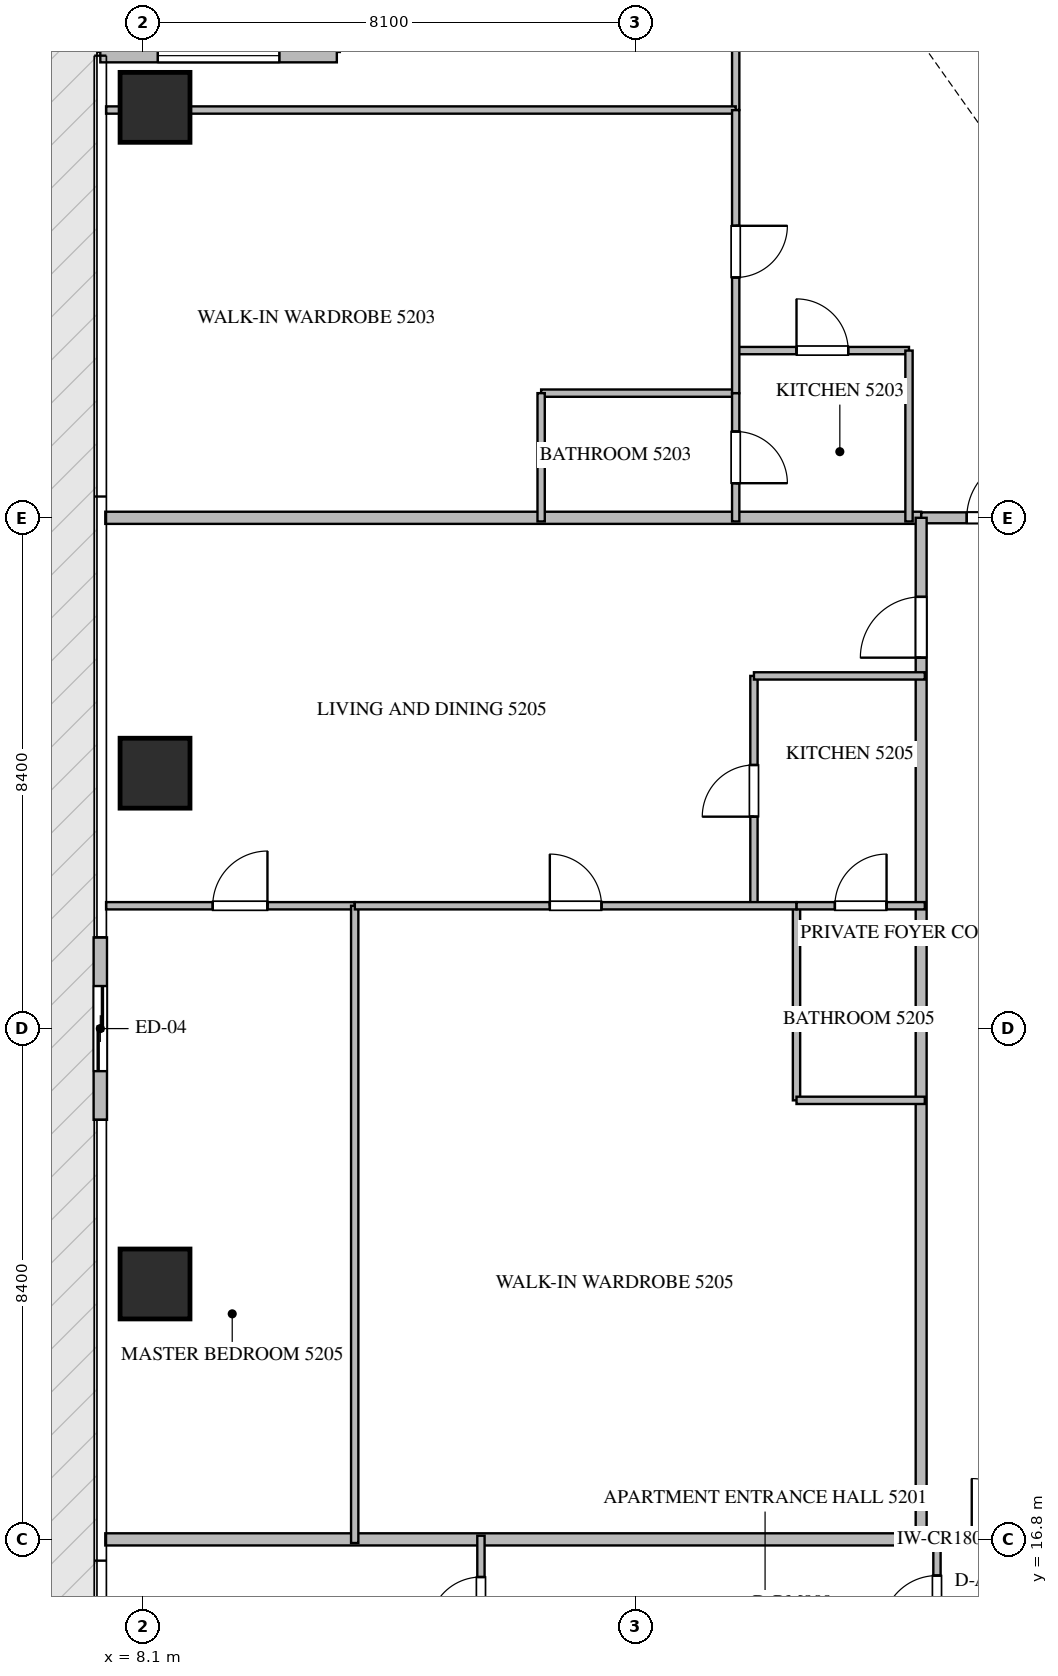
"""IFC4 building model, lengths in metres.
Left out: names, types, materials, properties, quantities, classifications, styles, units other than length and angle.
Written with IfcOpenShell. Run it as: python <this file> out.ifc"""

import sys

from ifc_helpers import new_model, si_unit, direction, frame, frame_2d, origin, origin_2d, place, context, subcontext, project, spatial, rectangle, extrude, source, transform, mapped, element, fill, save


model = new_model("IFC4")
c1 = context("Model", 3, precision=1e-05, world=origin(), true_north=direction((0.0, 1.0)))
c2 = subcontext(c1, "Body", "Model", "MODEL_VIEW")
j1 = project(units=[si_unit("LENGTHUNIT", "METRE"), si_unit("PLANEANGLEUNIT", "RADIAN")], contexts=[c1])
p1 = place(None, origin())
s1 = spatial("IfcSite", under=j1, at=p1, CompositionType="ELEMENT")
p2 = place(p1, origin())
s2 = spatial("IfcBuilding", under=s1, at=p2, CompositionType="ELEMENT")
p3 = place(p2, frame((0.0, 0.0, 210.45)))
s3 = spatial("IfcBuildingStorey", under=s2, at=p3, CompositionType="ELEMENT", Elevation=210.45)
m1 = source(origin(), c2, "Body", "SweptSolid", [
    extrude(rectangle(XDim=1.15, YDim=1.15, at=origin_2d()), origin(), (0.0, 0.0, 1.0), 4.03),
])
for number, where, z_axis, x_axis in (
    (1, (8.3, 21.0, -0.44), (0.0, 0.0, 1.0), (1.0, 0.0, 0.0)),
    (2, (8.3, 29.4, -0.44), (0.0, 0.0, 1.0), (1.0, 0.0, 0.0)),
    (3, (8.3, 40.35, -0.44), (0.0, 0.0, 1.0), (1.0, 0.0, 0.0)),
):
    element("IfcColumn", number, at=place(p3, frame(where, z_axis=z_axis, x_axis=x_axis)), inside=s3, PredefinedType="COLUMN", context=c2, shape_type="MappedRepresentation", body=[
        mapped(m1, transform((0.0, 0.0, 0.0), scale=1.0)),
    ])
p4 = place(p3, frame((11.29, 41.2, 0.0), z_axis=(0.0, 0.0, 1.0), x_axis=(-1.0, 0.0, 0.0)))
e4 = element("IfcWall", 4, at=p4, inside=s3, PredefinedType="ELEMENTEDWALL", context=c2, shape_type="SweptSolid", body=[
    extrude(rectangle(XDim=3.89, YDim=0.22, at=frame_2d((1.945, 0.0))), origin(), (0.0, 0.0, 1.0), 3.575),
])
p5 = place(p4, frame((0.945, 0.0, 0.65)))
e5 = element("IfcOpeningElement", 5, at=p5, cuts=e4, PredefinedType="OPENING", context=c2, shape_type="SweptSolid", body=[
    extrude(rectangle(XDim=2.0, YDim=2.2, at=frame_2d((1.0, 1.1))), frame((0.0, 0.12, 0.0), z_axis=(0.0, -1.0, 0.0), x_axis=(1.0, 0.0, 0.0)), (0.0, 0.0, 1.0), 0.24),
])
p6 = place(p3, frame((7.4, 26.7, 0.0), z_axis=(0.0, 0.0, 1.0), x_axis=(0.0, -1.0, 0.0)))
e6 = element("IfcWall", 6, at=p6, inside=s3, PredefinedType="ELEMENTEDWALL", context=c2, shape_type="SweptSolid", body=[
    extrude(rectangle(XDim=3.0, YDim=0.22, at=frame_2d((1.5, 0.0))), origin(), (0.0, 0.0, 1.0), 3.575),
])
p7 = place(p6, frame((0.8, 0.0, 0.0)))
e7 = element("IfcOpeningElement", 7, at=p7, cuts=e6, PredefinedType="OPENING", context=c2, shape_type="SweptSolid", body=[
    extrude(rectangle(XDim=1.4, YDim=2.25, at=frame_2d((0.7, 1.125))), frame((0.0, 0.12, 0.0), z_axis=(0.0, -1.0, 0.0), x_axis=(1.0, 0.0, 0.0)), (0.0, 0.0, 1.0), 0.24),
])
for number, where, z_axis, x_axis in (
    (8, (7.482, 16.8, 0.0), (0.0, 0.0, 1.0), (1.0, 0.0, 0.0)),
    (9, (7.482, 33.6, 0.0), (0.0, 0.0, 1.0), (1.0, 0.0, 0.0)),
):
    element("IfcWall", number, at=place(p3, frame(where, z_axis=z_axis, x_axis=x_axis)), inside=s3, PredefinedType="PARTITIONING", context=c2, shape_type="SweptSolid", body=[
        extrude(rectangle(XDim=13.418, YDim=0.2, at=frame_2d((6.709, 0.0))), origin(), (0.0, 0.0, 1.0), 3.59),
    ])
p8 = place(p3, frame((20.902, 16.8, 0.0), z_axis=(0.0, 0.0, 1.0), x_axis=(1.0, 0.0, 0.0)))
e10 = element("IfcWall", 10, at=p8, inside=s3, PredefinedType="PARTITIONING", context=c2, shape_type="SweptSolid", body=[
    extrude(rectangle(XDim=2.496, YDim=0.18, at=frame_2d((1.248, 0.0))), origin(), (0.0, 0.0, 1.0), 3.59),
])
p9 = place(p8, frame((0.83, 0.0, 0.0)))
e11 = element("IfcOpeningElement", 11, at=p9, cuts=e10, PredefinedType="OPENING", context=c2, shape_type="SweptSolid", body=[
    extrude(rectangle(XDim=1.0, YDim=2.15, at=frame_2d((0.5, 1.075))), frame((0.0, 0.1, 0.0), z_axis=(0.0, -1.0, 0.0), x_axis=(1.0, 0.0, 0.0)), (0.0, 0.0, 1.0), 0.2),
])
p10 = place(p3, frame((20.902, 33.6, 0.0), z_axis=(0.0, 0.0, 1.0), x_axis=(1.0, 0.0, 0.0)))
e12 = element("IfcWall", 12, at=p10, inside=s3, PredefinedType="PARTITIONING", context=c2, shape_type="SweptSolid", body=[
    extrude(rectangle(XDim=2.496, YDim=0.18, at=frame_2d((1.248, 0.0))), origin(), (0.0, 0.0, 1.0), 3.59),
])
p11 = place(p10, frame((0.748, 0.0, 0.0)))
e13 = element("IfcOpeningElement", 13, at=p11, cuts=e12, PredefinedType="OPENING", context=c2, shape_type="SweptSolid", body=[
    extrude(rectangle(XDim=1.0, YDim=2.15, at=frame_2d((0.5, 1.075))), frame((0.0, 0.1, 0.0), z_axis=(0.0, -1.0, 0.0), x_axis=(1.0, 0.0, 0.0)), (0.0, 0.0, 1.0), 0.2),
])
p12 = place(p3, frame((20.9, 16.8, 0.0), z_axis=(0.0, 0.0, 1.0), x_axis=(0.0, 1.0, 0.0)))
e14 = element("IfcWall", 14, at=p12, inside=s3, PredefinedType="PARTITIONING", context=c2, shape_type="SweptSolid", body=[
    extrude(rectangle(XDim=16.8, YDim=0.18, at=frame_2d((8.4, 0.0))), origin(), (0.0, 0.0, 1.0), 3.59),
])
p13 = place(p12, frame((14.5, 0.0, 0.0)))
e15 = element("IfcOpeningElement", 15, at=p13, cuts=e14, PredefinedType="OPENING", context=c2, shape_type="SweptSolid", body=[
    extrude(rectangle(XDim=1.0, YDim=2.15, at=frame_2d((0.5, 1.075))), frame((0.0, 0.1, 0.0), z_axis=(0.0, -1.0, 0.0), x_axis=(1.0, 0.0, 0.0)), (0.0, 0.0, 1.0), 0.2),
])
p14 = place(p3, frame((21.16, 14.65, 0.0), z_axis=(0.0, 0.0, 1.0), x_axis=(0.0, 1.0, 0.0)))
e16 = element("IfcWall", 16, at=p14, inside=s3, PredefinedType="PARTITIONING", context=c2, shape_type="SweptSolid", body=[
    extrude(rectangle(XDim=2.21, YDim=0.12, at=frame_2d((1.105, 0.0))), origin(), (0.0, 0.0, 1.0), 3.59),
])
p15 = place(p14, frame((0.655, 0.0, 0.0)))
e17 = element("IfcOpeningElement", 17, at=p15, cuts=e16, PredefinedType="OPENING", context=c2, shape_type="SweptSolid", body=[
    extrude(rectangle(XDim=0.9, YDim=2.1, at=frame_2d((0.45, 1.05))), frame((0.0, 0.07, 0.0), z_axis=(0.0, -1.0, 0.0), x_axis=(1.0, 0.0, 0.0)), (0.0, 0.0, 1.0), 0.14),
])
p16 = place(p3, frame((13.66, 14.652, 0.0), z_axis=(0.0, 0.0, 1.0), x_axis=(0.0, 1.0, 0.0)))
e18 = element("IfcWall", 18, at=p16, inside=s3, PredefinedType="PARTITIONING", context=c2, shape_type="SweptSolid", body=[
    extrude(rectangle(XDim=2.208, YDim=0.12, at=frame_2d((1.104, 0.0))), origin(), (0.0, 0.0, 1.0), 3.59),
])
p17 = place(p16, frame((0.679, 0.0, 0.0)))
e19 = element("IfcOpeningElement", 19, at=p17, cuts=e18, PredefinedType="OPENING", context=c2, shape_type="SweptSolid", body=[
    extrude(rectangle(XDim=0.85, YDim=2.1, at=frame_2d((0.425, 1.05))), frame((0.0, 0.07, 0.0), z_axis=(0.0, -1.0, 0.0), x_axis=(1.0, 0.0, 0.0)), (0.0, 0.0, 1.0), 0.14),
])
p18 = place(p3, frame((17.85, 36.35, 0.0), z_axis=(0.0, 0.0, 1.0), x_axis=(1.0, 0.0, 0.0)))
e20 = element("IfcWall", 20, at=p18, inside=s3, PredefinedType="PARTITIONING", context=c2, shape_type="SweptSolid", body=[
    extrude(rectangle(XDim=2.85, YDim=0.12, at=frame_2d((1.425, 0.0))), origin(), (0.0, 0.0, 1.0), 3.59),
])
p19 = place(p18, frame((1.0, 0.0, 0.0)))
e21 = element("IfcOpeningElement", 21, at=p19, cuts=e20, PredefinedType="OPENING", context=c2, shape_type="SweptSolid", body=[
    extrude(rectangle(XDim=0.85, YDim=2.1, at=frame_2d((0.425, 1.05))), frame((0.0, 0.07, 0.0), z_axis=(0.0, -1.0, 0.0), x_axis=(1.0, 0.0, 0.0)), (0.0, 0.0, 1.0), 0.14),
])
p20 = place(p3, frame((20.7, 36.35, 0.0), z_axis=(0.0, 0.0, 1.0), x_axis=(0.0, -1.0, 0.0)))
e22 = element("IfcWall", 22, at=p20, inside=s3, PredefinedType="PARTITIONING", context=c2, shape_type="SweptSolid", body=[
    extrude(rectangle(XDim=2.81, YDim=0.12, at=frame_2d((1.405, 0.0))), origin(), (0.0, 0.0, 1.0), 3.59),
])
p21 = place(p3, frame((17.85, 49.105, 0.0), z_axis=(0.0, 0.0, 1.0), x_axis=(0.0, -1.0, 0.0)))
e23 = element("IfcWall", 23, at=p21, inside=s3, PredefinedType="PARTITIONING", context=c2, shape_type="SweptSolid", body=[
    extrude(rectangle(XDim=8.799, YDim=0.12, at=frame_2d((4.399, 0.0))), origin(), (0.0, 0.0, 1.0), 3.59),
])
p22 = place(p21, frame((4.344, 0.0, 0.0)))
e24 = element("IfcOpeningElement", 24, at=p22, cuts=e23, PredefinedType="OPENING", context=c2, shape_type="SweptSolid", body=[
    extrude(rectangle(XDim=0.9, YDim=2.1, at=frame_2d((0.45, 1.05))), frame((0.0, 0.07, 0.0), z_axis=(0.0, -1.0, 0.0), x_axis=(1.0, 0.0, 0.0)), (0.0, 0.0, 1.0), 0.14),
])
p23 = place(p3, frame((7.495, 40.306, 0.0), z_axis=(0.0, 0.0, 1.0), x_axis=(1.0, 0.0, 0.0)))
e25 = element("IfcWall", 25, at=p23, inside=s3, PredefinedType="PARTITIONING", context=c2, shape_type="SweptSolid", body=[
    extrude(rectangle(XDim=10.355, YDim=0.12, at=frame_2d((5.177, 0.0))), origin(), (0.0, 0.0, 1.0), 3.122),
])
p24 = place(p3, frame((14.65, 35.65, 0.0), z_axis=(0.0, 0.0, 1.0), x_axis=(1.0, 0.0, 0.0)))
e26 = element("IfcWall", 26, at=p24, inside=s3, PredefinedType="PARTITIONING", context=c2, shape_type="SweptSolid", body=[
    extrude(rectangle(XDim=3.2, YDim=0.12, at=frame_2d((1.6, 0.0))), origin(), (0.0, 0.0, 1.0), 3.59),
])
p25 = place(p3, frame((14.65, 35.65, 0.0), z_axis=(0.0, 0.0, 1.0), x_axis=(0.0, -1.0, 0.0)))
e27 = element("IfcWall", 27, at=p25, inside=s3, PredefinedType="PARTITIONING", context=c2, shape_type="SweptSolid", body=[
    extrude(rectangle(XDim=2.11, YDim=0.12, at=frame_2d((1.055, 0.0))), origin(), (0.0, 0.0, 1.0), 3.59),
])
p26 = place(p3, frame((17.85, 40.304, 0.0), z_axis=(0.0, 0.0, 1.0), x_axis=(0.0, -1.0, 0.0)))
e28 = element("IfcWall", 28, at=p26, inside=s3, PredefinedType="PARTITIONING", context=c2, shape_type="SweptSolid", body=[
    extrude(rectangle(XDim=4.654, YDim=0.12, at=frame_2d((2.327, 0.0))), origin(), (0.0, 0.0, 1.0), 3.59),
])
p27 = place(p26, frame((1.902, 0.0, 0.0)))
e29 = element("IfcOpeningElement", 29, at=p27, cuts=e28, PredefinedType="OPENING", context=c2, shape_type="SweptSolid", body=[
    extrude(rectangle(XDim=0.85, YDim=2.1, at=frame_2d((0.425, 1.05))), frame((0.0, 0.07, 0.0), z_axis=(0.0, -1.0, 0.0), x_axis=(1.0, 0.0, 0.0)), (0.0, 0.0, 1.0), 0.14),
])
p28 = place(p3, frame((17.85, 35.648, 0.0), z_axis=(0.0, 0.0, 1.0), x_axis=(0.0, -1.0, 0.0)))
e30 = element("IfcWall", 30, at=p28, inside=s3, PredefinedType="PARTITIONING", context=c2, shape_type="SweptSolid", body=[
    extrude(rectangle(XDim=2.108, YDim=0.12, at=frame_2d((1.054, 0.0))), origin(), (0.0, 0.0, 1.0), 3.59),
])
p29 = place(p28, frame((0.629, 0.0, 0.0)))
e31 = element("IfcOpeningElement", 31, at=p29, cuts=e30, PredefinedType="OPENING", context=c2, shape_type="SweptSolid", body=[
    extrude(rectangle(XDim=0.85, YDim=2.1, at=frame_2d((0.425, 1.05))), frame((0.0, 0.07, 0.0), z_axis=(0.0, -1.0, 0.0), x_axis=(1.0, 0.0, 0.0)), (0.0, 0.0, 1.0), 0.14),
])
p30 = place(p3, frame((18.15, 27.22, 0.0), z_axis=(0.0, 0.0, 1.0), x_axis=(0.0, 1.0, 0.0)))
e32 = element("IfcWall", 32, at=p30, inside=s3, PredefinedType="PARTITIONING", context=c2, shape_type="SweptSolid", body=[
    extrude(rectangle(XDim=3.78, YDim=0.12, at=frame_2d((1.89, 0.0))), origin(), (0.0, 0.0, 1.0), 3.59),
])
p31 = place(p30, frame((1.465, 0.0, 0.0)))
e33 = element("IfcOpeningElement", 33, at=p31, cuts=e32, PredefinedType="OPENING", context=c2, shape_type="SweptSolid", body=[
    extrude(rectangle(XDim=0.85, YDim=2.1, at=frame_2d((0.425, 1.05))), frame((0.0, 0.07, 0.0), z_axis=(0.0, -1.0, 0.0), x_axis=(1.0, 0.0, 0.0)), (0.0, 0.0, 1.0), 0.14),
])
p32 = place(p3, frame((18.15, 31.0, 0.0), z_axis=(0.0, 0.0, 1.0), x_axis=(1.0, 0.0, 0.0)))
e34 = element("IfcWall", 34, at=p32, inside=s3, PredefinedType="PARTITIONING", context=c2, shape_type="SweptSolid", body=[
    extrude(rectangle(XDim=2.81, YDim=0.12, at=frame_2d((1.405, 0.0))), origin(), (0.0, 0.0, 1.0), 3.59),
])
p33 = place(p3, frame((7.495, 27.22, 0.0), z_axis=(0.0, 0.0, 1.0), x_axis=(1.0, 0.0, 0.0)))
e35 = element("IfcWall", 35, at=p33, inside=s3, PredefinedType="PARTITIONING", context=c2, shape_type="SweptSolid", body=[
    extrude(rectangle(XDim=4.089, YDim=0.12, at=frame_2d((2.044, 0.0))), origin(), (0.0, 0.0, 1.0), 3.59),
])
p34 = place(p33, frame((1.754, 0.0, 0.0)))
e36 = element("IfcOpeningElement", 36, at=p34, cuts=e35, PredefinedType="OPENING", context=c2, shape_type="SweptSolid", body=[
    extrude(rectangle(XDim=0.9, YDim=2.1, at=frame_2d((0.45, 1.05))), frame((0.0, 0.07, 0.0), z_axis=(0.0, -1.0, 0.0), x_axis=(1.0, 0.0, 0.0)), (0.0, 0.0, 1.0), 0.14),
])
p35 = place(p3, frame((11.584, 16.74, 0.0), z_axis=(0.0, 0.0, 1.0), x_axis=(0.0, 1.0, 0.0)))
e37 = element("IfcWall", 37, at=p35, inside=s3, PredefinedType="PARTITIONING", context=c2, shape_type="SweptSolid", body=[
    extrude(rectangle(XDim=10.48, YDim=0.12, at=frame_2d((5.24, 0.0))), origin(), (0.0, 0.0, 1.0), 3.59),
])
p36 = place(p3, frame((18.85, 24.02, 0.0), z_axis=(0.0, 0.0, 1.0), x_axis=(0.0, 1.0, 0.0)))
e38 = element("IfcWall", 38, at=p36, inside=s3, PredefinedType="PARTITIONING", context=c2, shape_type="SweptSolid", body=[
    extrude(rectangle(XDim=3.2, YDim=0.12, at=frame_2d((1.6, 0.0))), origin(), (0.0, 0.0, 1.0), 3.59),
])
p37 = place(p3, frame((18.85, 24.02, 0.0), z_axis=(0.0, 0.0, 1.0), x_axis=(1.0, 0.0, 0.0)))
e39 = element("IfcWall", 39, at=p37, inside=s3, PredefinedType="PARTITIONING", context=c2, shape_type="SweptSolid", body=[
    extrude(rectangle(XDim=2.11, YDim=0.12, at=frame_2d((1.055, 0.0))), origin(), (0.0, 0.0, 1.0), 3.59),
])
p38 = place(p3, frame((11.586, 27.22, 0.0), z_axis=(0.0, 0.0, 1.0), x_axis=(1.0, 0.0, 0.0)))
e40 = element("IfcWall", 40, at=p38, inside=s3, PredefinedType="PARTITIONING", context=c2, shape_type="SweptSolid", body=[
    extrude(rectangle(XDim=7.264, YDim=0.12, at=frame_2d((3.632, 0.0))), origin(), (0.0, 0.0, 1.0), 3.59),
])
p39 = place(p38, frame((3.207, 0.0, 0.0)))
e41 = element("IfcOpeningElement", 41, at=p39, cuts=e40, PredefinedType="OPENING", context=c2, shape_type="SweptSolid", body=[
    extrude(rectangle(XDim=0.85, YDim=2.1, at=frame_2d((0.425, 1.05))), frame((0.0, 0.07, 0.0), z_axis=(0.0, -1.0, 0.0), x_axis=(1.0, 0.0, 0.0)), (0.0, 0.0, 1.0), 0.14),
])
p40 = place(p3, frame((18.852, 27.22, 0.0), z_axis=(0.0, 0.0, 1.0), x_axis=(1.0, 0.0, 0.0)))
e42 = element("IfcWall", 42, at=p40, inside=s3, PredefinedType="PARTITIONING", context=c2, shape_type="SweptSolid", body=[
    extrude(rectangle(XDim=2.108, YDim=0.12, at=frame_2d((1.054, 0.0))), origin(), (0.0, 0.0, 1.0), 3.59),
])
p41 = place(p40, frame((0.629, 0.0, 0.0)))
e43 = element("IfcOpeningElement", 43, at=p41, cuts=e42, PredefinedType="OPENING", context=c2, shape_type="SweptSolid", body=[
    extrude(rectangle(XDim=0.85, YDim=2.1, at=frame_2d((0.425, 1.05))), frame((0.0, 0.07, 0.0), z_axis=(0.0, -1.0, 0.0), x_axis=(1.0, 0.0, 0.0)), (0.0, 0.0, 1.0), 0.14),
])
m2 = source(origin(), c2, "Body", "SweptSolid", [
    extrude(rectangle(XDim=2.0, YDim=2.2, at=frame_2d((1.0, 1.1))), frame((0.0, 0.03, 0.0), z_axis=(0.0, -1.0, 0.0), x_axis=(1.0, 0.0, 0.0)), (0.0, 0.0, 1.0), 0.06),
])
p42 = place(p5, origin())
e44 = element("IfcWindow", 44, at=p42, inside=s3, PartitioningType="SINGLE_PANEL", PredefinedType="WINDOW", context=c2, shape_type="MappedRepresentation", body=[
    mapped(m2, transform((0.0, 0.0, 0.0), scale=1.0)),
])
fill(e5, e44)
m3 = source(origin(), c2, "Body", "SweptSolid", [
    extrude(rectangle(XDim=1.4, YDim=2.25, at=frame_2d((0.7, 1.125))), frame((0.0, 0.025, 0.0), z_axis=(0.0, -1.0, 0.0), x_axis=(1.0, 0.0, 0.0)), (0.0, 0.0, 1.0), 0.05),
])
p43 = place(p7, origin())
e45 = element("IfcDoor", 45, at=p43, inside=s3, OperationType="SLIDING_TO_LEFT", PredefinedType="DOOR", context=c2, shape_type="MappedRepresentation", body=[
    mapped(m3, transform((0.0, 0.0, 0.0), scale=1.0)),
])
fill(e7, e45)
m4 = source(origin(), c2, "Body", "SweptSolid", [
    extrude(rectangle(XDim=1.0, YDim=2.15, at=frame_2d((0.5, 1.075))), frame((0.0, 0.025, 0.0), z_axis=(0.0, -1.0, 0.0), x_axis=(1.0, 0.0, 0.0)), (0.0, 0.0, 1.0), 0.05),
])
p44 = place(p9, origin())
e46 = element("IfcDoor", 46, at=p44, inside=s3, OperationType="SINGLE_SWING_LEFT", PredefinedType="DOOR", context=c2, shape_type="MappedRepresentation", body=[
    mapped(m4, transform((0.0, 0.0, 0.0), scale=1.0)),
])
fill(e11, e46)
p45 = place(p11, origin())
e47 = element("IfcDoor", 47, at=p45, inside=s3, OperationType="SINGLE_SWING_RIGHT", PredefinedType="DOOR", context=c2, shape_type="MappedRepresentation", body=[
    mapped(m4, transform((0.0, 0.0, 0.0), scale=1.0)),
])
fill(e13, e47)
p46 = place(p13, origin())
e48 = element("IfcDoor", 48, at=p46, inside=s3, OperationType="SINGLE_SWING_LEFT", PredefinedType="DOOR", context=c2, shape_type="MappedRepresentation", body=[
    mapped(m4, transform((0.0, 0.0, 0.0), scale=1.0)),
])
fill(e15, e48)
m5 = source(origin(), c2, "Body", "SweptSolid", [
    extrude(rectangle(XDim=0.9, YDim=2.1, at=frame_2d((0.45, 1.05))), frame((0.0, 0.025, 0.0), z_axis=(0.0, -1.0, 0.0), x_axis=(1.0, 0.0, 0.0)), (0.0, 0.0, 1.0), 0.05),
])
p47 = place(p15, origin())
e49 = element("IfcDoor", 49, at=p47, inside=s3, OperationType="SINGLE_SWING_LEFT", PredefinedType="DOOR", context=c2, shape_type="MappedRepresentation", body=[
    mapped(m5, transform((0.0, 0.0, 0.0), scale=1.0)),
])
fill(e17, e49)
m6 = source(origin(), c2, "Body", "SweptSolid", [
    extrude(rectangle(XDim=0.85, YDim=2.1, at=frame_2d((0.425, 1.05))), frame((0.0, 0.025, 0.0), z_axis=(0.0, -1.0, 0.0), x_axis=(1.0, 0.0, 0.0)), (0.0, 0.0, 1.0), 0.05),
])
p48 = place(p17, origin())
e50 = element("IfcDoor", 50, at=p48, inside=s3, OperationType="SINGLE_SWING_LEFT", PredefinedType="DOOR", context=c2, shape_type="MappedRepresentation", body=[
    mapped(m6, transform((0.0, 0.0, 0.0), scale=1.0)),
])
fill(e19, e50)
p49 = place(p19, origin())
e51 = element("IfcDoor", 51, at=p49, inside=s3, OperationType="SINGLE_SWING_LEFT", PredefinedType="DOOR", context=c2, shape_type="MappedRepresentation", body=[
    mapped(m6, transform((0.0, 0.0, 0.0), scale=1.0)),
])
fill(e21, e51)
p50 = place(p27, origin())
e52 = element("IfcDoor", 52, at=p50, inside=s3, OperationType="SINGLE_SWING_LEFT", PredefinedType="DOOR", context=c2, shape_type="MappedRepresentation", body=[
    mapped(m6, transform((0.0, 0.0, 0.0), scale=1.0)),
])
fill(e29, e52)
p51 = place(p29, origin())
e53 = element("IfcDoor", 53, at=p51, inside=s3, OperationType="SINGLE_SWING_RIGHT", PredefinedType="DOOR", context=c2, shape_type="MappedRepresentation", body=[
    mapped(m6, transform((0.0, 0.0, 0.0), scale=1.0)),
])
fill(e31, e53)
p52 = place(p31, origin())
e54 = element("IfcDoor", 54, at=p52, inside=s3, OperationType="SINGLE_SWING_LEFT", PredefinedType="DOOR", context=c2, shape_type="MappedRepresentation", body=[
    mapped(m6, transform((0.0, 0.0, 0.0), scale=1.0)),
])
fill(e33, e54)
p53 = place(p34, origin())
e55 = element("IfcDoor", 55, at=p53, inside=s3, OperationType="SINGLE_SWING_RIGHT", PredefinedType="DOOR", context=c2, shape_type="MappedRepresentation", body=[
    mapped(m5, transform((0.0, 0.0, 0.0), scale=1.0)),
])
fill(e36, e55)
p54 = place(p39, origin())
e56 = element("IfcDoor", 56, at=p54, inside=s3, OperationType="SINGLE_SWING_LEFT", PredefinedType="DOOR", context=c2, shape_type="MappedRepresentation", body=[
    mapped(m6, transform((0.0, 0.0, 0.0), scale=1.0)),
])
fill(e41, e56)
p55 = place(p41, origin())
e57 = element("IfcDoor", 57, at=p55, inside=s3, OperationType="SINGLE_SWING_RIGHT", PredefinedType="DOOR", context=c2, shape_type="MappedRepresentation", body=[
    mapped(m6, transform((0.0, 0.0, 0.0), scale=1.0)),
])
fill(e43, e57)
save(model, sys.argv[1])
